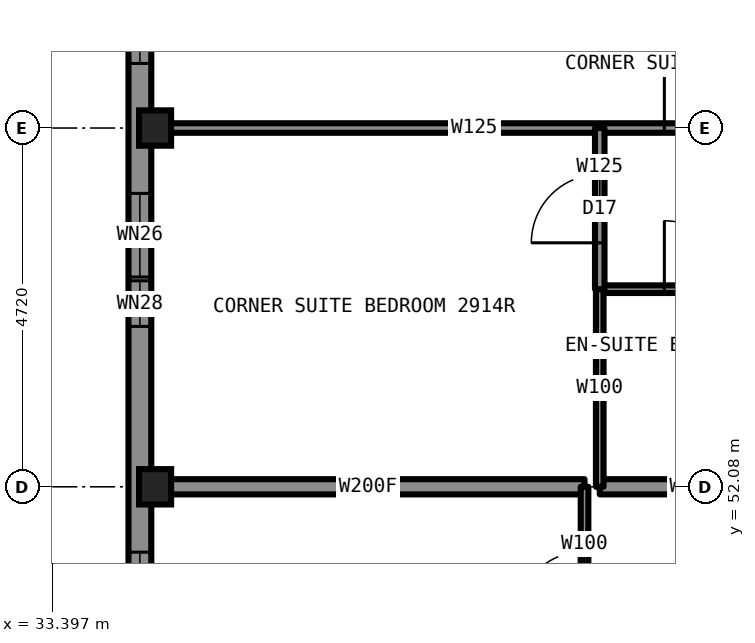
"""IFC4 building model, lengths in metres.
Left out: names, types, materials, properties, quantities, classifications, styles, units other than length and angle.
Written with IfcOpenShell. Run it as: python <this file> out.ifc"""

import sys

from ifc_helpers import new_model, si_unit, direction, frame, frame_2d, origin, origin_2d, place, context, subcontext, project, spatial, rectangle, i_section, extrude, element, fill, save


model = new_model("IFC4")
c1 = context("Model", 3, precision=1e-05, world=origin(), true_north=direction((0.0, 1.0)))
c2 = subcontext(c1, "Body", "Model", "MODEL_VIEW")
j1 = project(units=[si_unit("LENGTHUNIT", "METRE"), si_unit("PLANEANGLEUNIT", "RADIAN")], contexts=[c1])
p1 = place(None, origin())
s1 = spatial("IfcSite", under=j1, at=p1, CompositionType="ELEMENT")
p2 = place(p1, origin())
s2 = spatial("IfcBuilding", under=s1, at=p2, CompositionType="ELEMENT")
p3 = place(p2, frame((0.0, 0.0, 103.9)))
s3 = spatial("IfcBuildingStorey", under=s2, at=p3, CompositionType="ELEMENT", Elevation=103.9)
for number, where, z_axis, x_axis in (
    (1, (34.75, 52.08, 0.0), (0.0, 0.0, 1.0), (1.0, 0.0, 0.0)),
    (2, (34.75, 56.8, 0.0), (0.0, 0.0, 1.0), (1.0, 0.0, 0.0)),
):
    element("IfcColumn", number, at=place(p3, frame(where, z_axis=z_axis, x_axis=x_axis)), inside=s3, PredefinedType="COLUMN", context=c2, shape_type="SweptSolid", body=[
        extrude(i_section(OverallWidth=0.422, OverallDepth=0.465, WebThickness=0.045, FlangeThickness=0.073, at=origin_2d()), origin(), (0.0, 0.0, 1.0), 3.5),
    ])
p4 = place(p3, frame((34.7, 56.8, 0.0), z_axis=(0.0, 0.0, 1.0), x_axis=(1.0, 0.0, 0.0)))
e3 = element("IfcWall", 3, at=p4, inside=s3, PredefinedType="PARTITIONING", context=c2, shape_type="SweptSolid", body=[
    extrude(rectangle(XDim=8.5, YDim=0.125, at=frame_2d((4.25, 0.0))), origin(), (0.0, 0.0, 1.0), 2.573),
])
p5 = place(p4, frame((6.75, 0.0, 0.0)))
e4 = element("IfcOpeningElement", 4, at=p5, cuts=e3, PredefinedType="OPENING", context=c2, shape_type="SweptSolid", body=[
    extrude(rectangle(XDim=0.9, YDim=2.2, at=frame_2d((0.45, 1.1))), frame((0.0, 0.073, 0.0), z_axis=(0.0, -1.0, 0.0), x_axis=(1.0, 0.0, 0.0)), (0.0, 0.0, 1.0), 0.145),
])
p6 = place(p3, frame((34.7, 52.08, 0.0), z_axis=(0.0, 0.0, 1.0), x_axis=(1.0, 0.0, 0.0)))
e5 = element("IfcWall", 5, at=p6, inside=s3, PredefinedType="PARTITIONING", context=c2, shape_type="SweptSolid", body=[
    extrude(rectangle(XDim=5.7, YDim=0.2, at=frame_2d((2.85, 0.0))), origin(), (0.0, 0.0, 1.0), 2.573),
])
p7 = place(p3, frame((40.6, 52.08, 0.0), z_axis=(0.0, 0.0, 1.0), x_axis=(1.0, 0.0, 0.0)))
e6 = element("IfcWall", 6, at=p7, inside=s3, PredefinedType="PARTITIONING", context=c2, shape_type="SweptSolid", body=[
    extrude(rectangle(XDim=2.6, YDim=0.2, at=frame_2d((1.3, 0.0))), origin(), (0.0, 0.0, 1.0), 2.573),
])
p8 = place(p3, frame((40.6, 54.68, 0.0), z_axis=(0.0, 0.0, 1.0), x_axis=(1.0, 0.0, 0.0)))
e7 = element("IfcWall", 7, at=p8, inside=s3, PredefinedType="PARTITIONING", context=c2, shape_type="SweptSolid", body=[
    extrude(rectangle(XDim=2.6, YDim=0.1, at=frame_2d((1.3, 0.0))), origin(), (0.0, 0.0, 1.0), 3.33),
])
p9 = place(p8, frame((0.85, 0.0, 0.0)))
e8 = element("IfcOpeningElement", 8, at=p9, cuts=e7, PredefinedType="OPENING", context=c2, shape_type="SweptSolid", body=[
    extrude(rectangle(XDim=0.9, YDim=2.1, at=frame_2d((0.45, 1.05))), frame((0.0, 0.06, 0.0), z_axis=(0.0, -1.0, 0.0), x_axis=(1.0, 0.0, 0.0)), (0.0, 0.0, 1.0), 0.12),
])
p10 = place(p3, frame((40.6, 52.08, 0.0), z_axis=(0.0, 0.0, 1.0), x_axis=(0.0, 1.0, 0.0)))
e9 = element("IfcWall", 9, at=p10, inside=s3, PredefinedType="PARTITIONING", context=c2, shape_type="SweptSolid", body=[
    extrude(rectangle(XDim=2.6, YDim=0.1, at=frame_2d((1.3, 0.0))), origin(), (0.0, 0.0, 1.0), 3.33),
])
p11 = place(p3, frame((40.6, 54.68, 0.0), z_axis=(0.0, 0.0, 1.0), x_axis=(0.0, 1.0, 0.0)))
e10 = element("IfcWall", 10, at=p11, inside=s3, PredefinedType="PARTITIONING", context=c2, shape_type="SweptSolid", body=[
    extrude(rectangle(XDim=2.12, YDim=0.125, at=frame_2d((1.06, 0.0))), origin(), (0.0, 0.0, 1.0), 3.33),
])
p12 = place(p11, frame((0.61, 0.0, 0.0)))
e11 = element("IfcOpeningElement", 11, at=p12, cuts=e10, PredefinedType="OPENING", context=c2, shape_type="SweptSolid", body=[
    extrude(rectangle(XDim=0.9, YDim=2.2, at=frame_2d((0.45, 1.1))), frame((0.0, 0.073, 0.0), z_axis=(0.0, -1.0, 0.0), x_axis=(1.0, 0.0, 0.0)), (0.0, 0.0, 1.0), 0.145),
])
p13 = place(p3, frame((40.4, 49.48, 0.0), z_axis=(0.0, 0.0, 1.0), x_axis=(0.0, 1.0, 0.0)))
e12 = element("IfcWall", 12, at=p13, inside=s3, PredefinedType="PARTITIONING", context=c2, shape_type="SweptSolid", body=[
    extrude(rectangle(XDim=2.6, YDim=0.1, at=frame_2d((1.3, 0.0))), origin(), (0.0, 0.0, 1.0), 3.33),
])
p14 = place(p13, frame((0.85, 0.0, 0.0)))
e13 = element("IfcOpeningElement", 13, at=p14, cuts=e12, PredefinedType="OPENING", context=c2, shape_type="SweptSolid", body=[
    extrude(rectangle(XDim=0.9, YDim=2.1, at=frame_2d((0.45, 1.05))), frame((0.0, 0.06, 0.0), z_axis=(0.0, -1.0, 0.0), x_axis=(1.0, 0.0, 0.0)), (0.0, 0.0, 1.0), 0.12),
])
p15 = place(p3, frame((34.55, 60.1, 0.0), z_axis=(0.0, 0.0, 1.0), x_axis=(0.0, -1.0, 0.0)))
e14 = element("IfcWall", 14, at=p15, inside=s3, PredefinedType="SOLIDWALL", context=c2, shape_type="SweptSolid", body=[
    extrude(rectangle(XDim=30.2, YDim=0.3, at=frame_2d((15.1, 0.0))), origin(), (0.0, 0.0, 1.0), 2.83),
])
p16 = place(p15, frame((4.16, 0.0, 0.5)))
e15 = element("IfcOpeningElement", 15, at=p16, cuts=e14, PredefinedType="OPENING", context=c2, shape_type="SweptSolid", body=[
    extrude(rectangle(XDim=3.0, YDim=2.0, at=frame_2d((1.5, 1.0))), frame((0.0, 0.16, 0.0), z_axis=(0.0, -1.0, 0.0), x_axis=(1.0, 0.0, 0.0)), (0.0, 0.0, 1.0), 0.32),
])
p17 = place(p15, frame((8.88, 0.0, 0.5)))
e16 = element("IfcOpeningElement", 16, at=p17, cuts=e14, PredefinedType="OPENING", context=c2, shape_type="SweptSolid", body=[
    extrude(rectangle(XDim=3.0, YDim=2.0, at=frame_2d((1.5, 1.0))), frame((0.0, 0.16, 0.0), z_axis=(0.0, -1.0, 0.0), x_axis=(1.0, 0.0, 0.0)), (0.0, 0.0, 1.0), 0.32),
])
p18 = place(p15, frame((13.6, 0.0, 0.5)))
e17 = element("IfcOpeningElement", 17, at=p18, cuts=e14, PredefinedType="OPENING", context=c2, shape_type="SweptSolid", body=[
    extrude(rectangle(XDim=3.0, YDim=2.0, at=frame_2d((1.5, 1.0))), frame((0.0, 0.16, 0.0), z_axis=(0.0, -1.0, 0.0), x_axis=(1.0, 0.0, 0.0)), (0.0, 0.0, 1.0), 0.32),
])
p19 = place(p15, frame((18.32, 0.0, 0.5)))
e18 = element("IfcOpeningElement", 18, at=p19, cuts=e14, PredefinedType="OPENING", context=c2, shape_type="SweptSolid", body=[
    extrude(rectangle(XDim=3.0, YDim=2.0, at=frame_2d((1.5, 1.0))), frame((0.0, 0.16, 0.0), z_axis=(0.0, -1.0, 0.0), x_axis=(1.0, 0.0, 0.0)), (0.0, 0.0, 1.0), 0.32),
])
p20 = place(p15, frame((23.04, 0.0, 0.5)))
e19 = element("IfcOpeningElement", 19, at=p20, cuts=e14, PredefinedType="OPENING", context=c2, shape_type="SweptSolid", body=[
    extrude(rectangle(XDim=3.0, YDim=2.0, at=frame_2d((1.5, 1.0))), frame((0.0, 0.16, 0.0), z_axis=(0.0, -1.0, 0.0), x_axis=(1.0, 0.0, 0.0)), (0.0, 0.0, 1.0), 0.32),
])
p21 = place(p14, origin())
e20 = element("IfcDoor", 20, at=p21, inside=s3, OperationType="SINGLE_SWING_RIGHT", PredefinedType="DOOR", context=c2, shape_type="SweptSolid", body=[
    extrude(rectangle(XDim=0.9, YDim=2.1, at=frame_2d((0.45, 1.05))), frame((0.0, 0.025, 0.0), z_axis=(0.0, -1.0, 0.0), x_axis=(1.0, 0.0, 0.0)), (0.0, 0.0, 1.0), 0.05),
])
fill(e13, e20)
p22 = place(p5, origin())
e21 = element("IfcDoor", 21, at=p22, inside=s3, OperationType="SINGLE_SWING_LEFT", PredefinedType="DOOR", context=c2, shape_type="SweptSolid", body=[
    extrude(rectangle(XDim=0.9, YDim=2.2, at=frame_2d((0.45, 1.1))), frame((0.0, 0.025, 0.0), z_axis=(0.0, -1.0, 0.0), x_axis=(1.0, 0.0, 0.0)), (0.0, 0.0, 1.0), 0.05),
])
fill(e4, e21)
p23 = place(p9, origin())
e22 = element("IfcDoor", 22, at=p23, inside=s3, OperationType="SINGLE_SWING_RIGHT", PredefinedType="DOOR", context=c2, shape_type="SweptSolid", body=[
    extrude(rectangle(XDim=0.9, YDim=2.1, at=frame_2d((0.45, 1.05))), frame((0.0, 0.025, 0.0), z_axis=(0.0, -1.0, 0.0), x_axis=(1.0, 0.0, 0.0)), (0.0, 0.0, 1.0), 0.05),
])
fill(e8, e22)
p24 = place(p12, origin())
e23 = element("IfcDoor", 23, at=p24, inside=s3, OperationType="SINGLE_SWING_LEFT", PredefinedType="DOOR", context=c2, shape_type="SweptSolid", body=[
    extrude(rectangle(XDim=0.9, YDim=2.2, at=frame_2d((0.45, 1.1))), frame((0.0, 0.025, 0.0), z_axis=(0.0, -1.0, 0.0), x_axis=(1.0, 0.0, 0.0)), (0.0, 0.0, 1.0), 0.05),
])
fill(e11, e23)
p25 = place(p16, origin())
e24 = element("IfcWindow", 24, at=p25, inside=s3, PartitioningType="SINGLE_PANEL", PredefinedType="WINDOW", context=c2, shape_type="SweptSolid", body=[
    extrude(rectangle(XDim=3.0, YDim=2.0, at=frame_2d((1.5, 1.0))), frame((0.0, 0.03, 0.0), z_axis=(0.0, -1.0, 0.0), x_axis=(1.0, 0.0, 0.0)), (0.0, 0.0, 1.0), 0.06),
])
fill(e15, e24)
p26 = place(p17, origin())
e25 = element("IfcWindow", 25, at=p26, inside=s3, PartitioningType="SINGLE_PANEL", PredefinedType="WINDOW", context=c2, shape_type="SweptSolid", body=[
    extrude(rectangle(XDim=3.0, YDim=2.0, at=frame_2d((1.5, 1.0))), frame((0.0, 0.03, 0.0), z_axis=(0.0, -1.0, 0.0), x_axis=(1.0, 0.0, 0.0)), (0.0, 0.0, 1.0), 0.06),
])
fill(e16, e25)
save(model, sys.argv[1])
